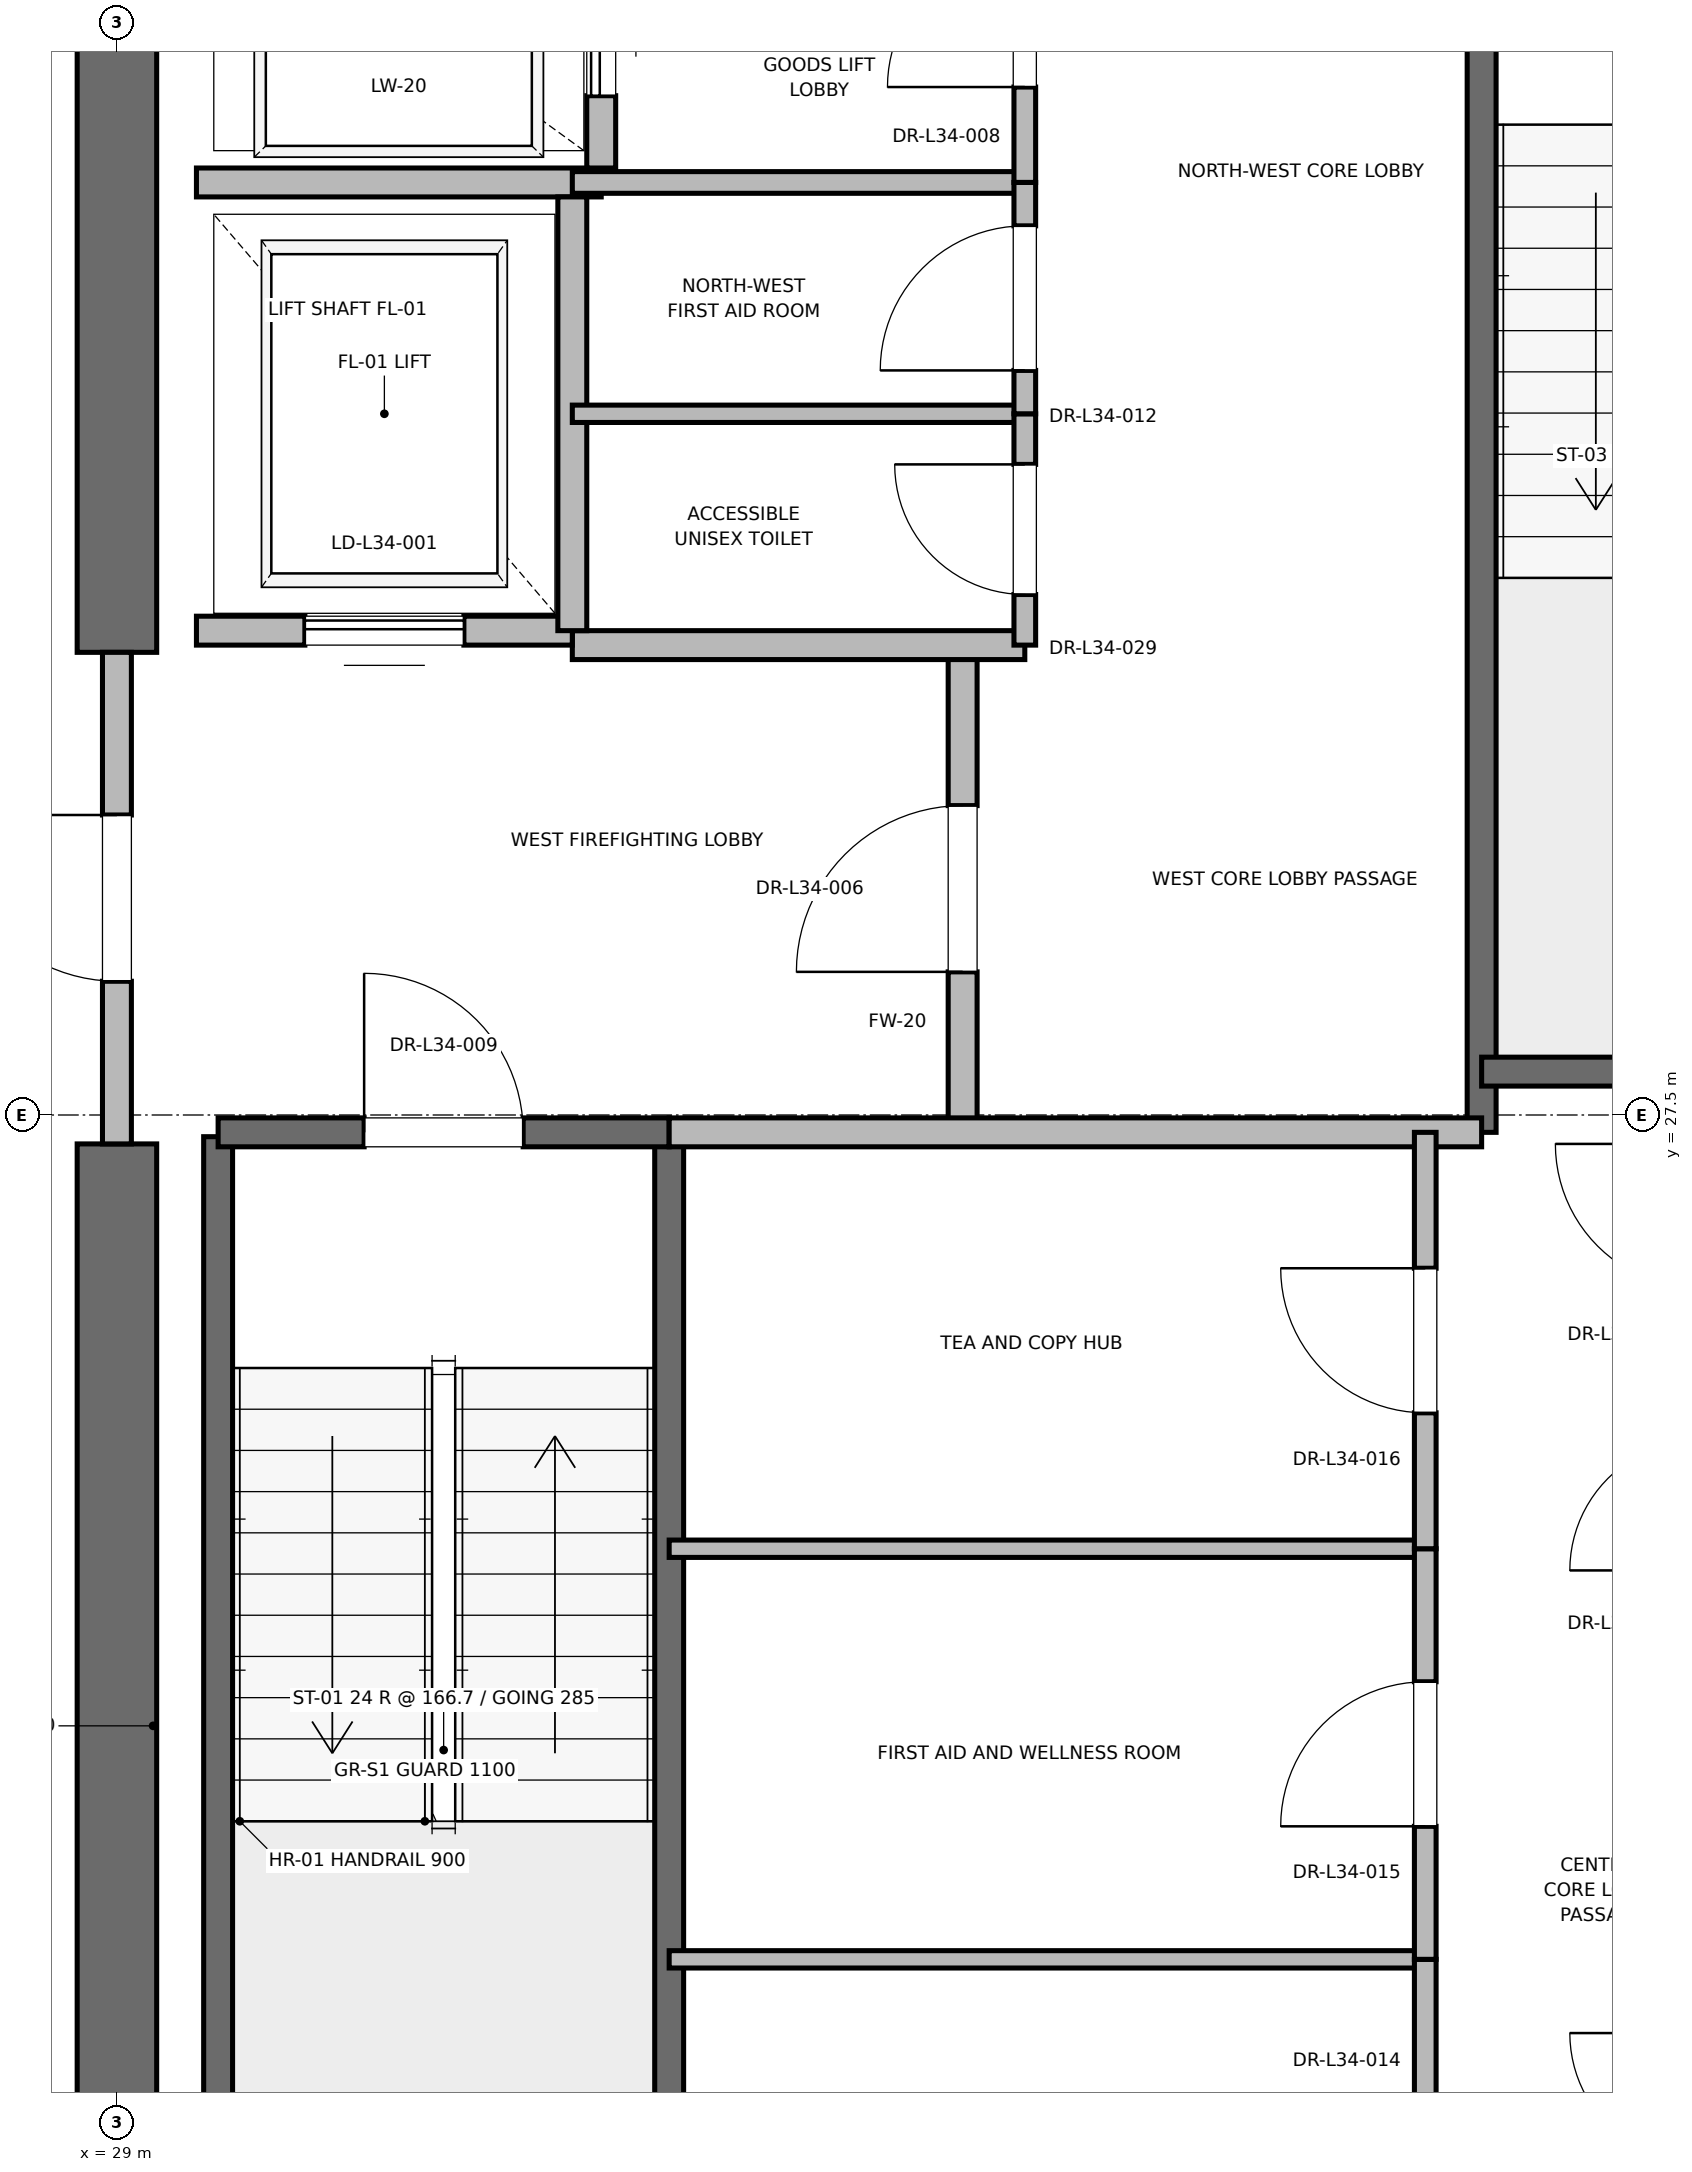
"""IFC4 building model, lengths in metres.
Left out: names, types, materials, properties, quantities, classifications, styles, units other than length and angle.
Written with IfcOpenShell. Run it as: python <this file> out.ifc"""

import sys

from ifc_helpers import new_model, si_unit, direction, frame, frame_2d, origin, place, context, subcontext, project, spatial, rectangle, extrude, element, fill, save


model = new_model("IFC4")
c1 = context("Model", 3, precision=1e-05, world=origin(), true_north=direction((0.0, 1.0)))
c2 = subcontext(c1, "Body", "Model", "MODEL_VIEW")
j1 = project(units=[si_unit("LENGTHUNIT", "METRE"), si_unit("PLANEANGLEUNIT", "RADIAN")], contexts=[c1])
p1 = place(None, origin())
s1 = spatial("IfcSite", under=j1, at=p1, CompositionType="ELEMENT")
p2 = place(p1, origin())
s2 = spatial("IfcBuilding", under=s1, at=p2, CompositionType="ELEMENT")
p3 = place(p2, frame((0.0, 0.0, 148.4)))
s3 = spatial("IfcBuildingStorey", under=s2, at=p3, CompositionType="ELEMENT", Elevation=148.4)
p4 = place(p3, frame((29.0, 18.5, 0.0), z_axis=(0.0, 0.0, 1.0), x_axis=(0.0, 1.0, 0.0)))
e1 = element("IfcWall", 1, at=p4, inside=s3, PredefinedType="SHEAR", context=c2, shape_type="SweptSolid", body=[
    extrude(rectangle(XDim=8.8, YDim=0.55, at=frame_2d((4.4, 0.0))), origin(), (0.0, 0.0, 1.0), 3.775),
])
p5 = place(p3, frame((29.0, 30.7, 0.0), z_axis=(0.0, 0.0, 1.0), x_axis=(0.0, 1.0, 0.0)))
e2 = element("IfcWall", 2, at=p5, inside=s3, PredefinedType="SHEAR", context=c2, shape_type="SweptSolid", body=[
    extrude(rectangle(XDim=5.8, YDim=0.55, at=frame_2d((2.9, 0.0))), origin(), (0.0, 0.0, 1.0), 3.775),
])
p6 = place(p3, frame((29.7, 19.2, 0.0), z_axis=(0.0, 0.0, 1.0), x_axis=(0.0, 1.0, 0.0)))
e3 = element("IfcWall", 3, at=p6, inside=s3, PredefinedType="SOLIDWALL", context=c2, shape_type="SweptSolid", body=[
    extrude(rectangle(XDim=8.15, YDim=0.2, at=frame_2d((4.075, 0.0))), origin(), (0.0, 0.0, 1.0), 3.775),
])
p7 = place(p3, frame((32.82, 18.6, 0.0), z_axis=(0.0, 0.0, 1.0), x_axis=(0.0, 1.0, 0.0)))
e4 = element("IfcWall", 4, at=p7, inside=s3, PredefinedType="SOLIDWALL", context=c2, shape_type="SweptSolid", body=[
    extrude(rectangle(XDim=8.78, YDim=0.2, at=frame_2d((4.39, 0.0))), origin(), (0.0, 0.0, 1.0), 3.775),
])
p8 = place(p3, frame((29.7, 27.38, 0.0), z_axis=(0.0, 0.0, 1.0), x_axis=(1.0, 0.0, 0.0)))
e5 = element("IfcWall", 5, at=p8, inside=s3, PredefinedType="SOLIDWALL", context=c2, shape_type="SweptSolid", body=[
    extrude(rectangle(XDim=3.12, YDim=0.2, at=frame_2d((1.56, 0.0))), origin(), (0.0, 0.0, 1.0), 3.775),
])
p9 = place(p8, frame((1.01, 0.0, 0.0)))
e6 = element("IfcOpeningElement", 6, at=p9, cuts=e5, PredefinedType="OPENING", context=c2, shape_type="SweptSolid", body=[
    extrude(rectangle(XDim=1.1, YDim=2.15, at=frame_2d((0.55, 1.075))), frame((0.0, 0.1, 0.0), z_axis=(0.0, -1.0, 0.0), x_axis=(1.0, 0.0, 0.0)), (0.0, 0.0, 1.0), 0.2),
])
p10 = place(p3, frame((38.44, 27.38, 0.0), z_axis=(0.0, 0.0, 1.0), x_axis=(0.0, 1.0, 0.0)))
e7 = element("IfcWall", 7, at=p10, inside=s3, PredefinedType="SOLIDWALL", context=c2, shape_type="SweptSolid", body=[
    extrude(rectangle(XDim=8.87, YDim=0.2, at=frame_2d((4.435, 0.0))), origin(), (0.0, 0.0, 1.0), 3.775),
])
p11 = place(p3, frame((38.44, 27.8, 0.0), z_axis=(0.0, 0.0, 1.0), x_axis=(1.0, 0.0, 0.0)))
e8 = element("IfcWall", 8, at=p11, inside=s3, PredefinedType="SOLIDWALL", context=c2, shape_type="SweptSolid", body=[
    extrude(rectangle(XDim=3.32, YDim=0.2, at=frame_2d((1.66, 0.0))), origin(), (0.0, 0.0, 1.0), 3.775),
])
p12 = place(p3, frame((34.85, 27.38, 0.0), z_axis=(0.0, 0.0, 1.0), x_axis=(0.0, 1.0, 0.0)))
e9 = element("IfcWall", 9, at=p12, inside=s3, PredefinedType="PARTITIONING", context=c2, shape_type="SweptSolid", body=[
    extrude(rectangle(XDim=3.37, YDim=0.2, at=frame_2d((1.685, 0.0))), origin(), (0.0, 0.0, 1.0), 3.775),
])
p13 = place(p12, frame((1.11, 0.0, 0.0)))
e10 = element("IfcOpeningElement", 10, at=p13, cuts=e9, PredefinedType="OPENING", context=c2, shape_type="SweptSolid", body=[
    extrude(rectangle(XDim=1.15, YDim=2.2, at=frame_2d((0.575, 1.1))), frame((0.0, 0.1, 0.0), z_axis=(0.0, -1.0, 0.0), x_axis=(1.0, 0.0, 0.0)), (0.0, 0.0, 1.0), 0.2),
])
p14 = place(p3, frame((29.0, 27.3, 0.0), z_axis=(0.0, 0.0, 1.0), x_axis=(0.0, 1.0, 0.0)))
e11 = element("IfcWall", 11, at=p14, inside=s3, PredefinedType="PARTITIONING", context=c2, shape_type="SweptSolid", body=[
    extrude(rectangle(XDim=3.4, YDim=0.2, at=frame_2d((1.7, 0.0))), origin(), (0.0, 0.0, 1.0), 2.755),
])
p15 = place(p14, frame((1.125, 0.0, 0.0)))
e12 = element("IfcOpeningElement", 12, at=p15, cuts=e11, PredefinedType="OPENING", context=c2, shape_type="SweptSolid", body=[
    extrude(rectangle(XDim=1.15, YDim=2.2, at=frame_2d((0.575, 1.1))), frame((0.0, 0.1, 0.0), z_axis=(0.0, -1.0, 0.0), x_axis=(1.0, 0.0, 0.0)), (0.0, 0.0, 1.0), 0.2),
])
p16 = place(p3, frame((32.82, 27.38, 0.0), z_axis=(0.0, 0.0, 1.0), x_axis=(1.0, 0.0, 0.0)))
e13 = element("IfcWall", 13, at=p16, inside=s3, PredefinedType="PARTITIONING", context=c2, shape_type="SweptSolid", body=[
    extrude(rectangle(XDim=5.62, YDim=0.2, at=frame_2d((2.81, 0.0))), origin(), (0.0, 0.0, 1.0), 3.775),
])
p17 = place(p3, frame((32.15, 30.75, 0.0), z_axis=(0.0, 0.0, 1.0), x_axis=(1.0, 0.0, 0.0)))
e14 = element("IfcWall", 14, at=p17, inside=s3, PredefinedType="PARTITIONING", context=c2, shape_type="SweptSolid", body=[
    extrude(rectangle(XDim=3.13, YDim=0.2, at=frame_2d((1.565, 0.0))), origin(), (0.0, 0.0, 1.0), 3.775),
])
p18 = place(p3, frame((29.55, 30.85, 0.0), z_axis=(0.0, 0.0, 1.0), x_axis=(1.0, 0.0, 0.0)))
e15 = element("IfcWall", 15, at=p18, inside=s3, PredefinedType="SOLIDWALL", context=c2, shape_type="SweptSolid", body=[
    extrude(rectangle(XDim=2.6, YDim=0.2, at=frame_2d((1.3, 0.0))), origin(), (0.0, 0.0, 1.0), 2.755),
])
p19 = place(p18, frame((0.75, 0.0, 0.0)))
e16 = element("IfcOpeningElement", 16, at=p19, cuts=e15, PredefinedType="OPENING", context=c2, shape_type="SweptSolid", body=[
    extrude(rectangle(XDim=1.1, YDim=2.2, at=frame_2d((0.55, 1.1))), frame((0.0, 0.1, 0.0), z_axis=(0.0, -1.0, 0.0), x_axis=(1.0, 0.0, 0.0)), (0.0, 0.0, 1.0), 0.2),
])
p20 = place(p3, frame((29.55, 33.95, 0.0), z_axis=(0.0, 0.0, 1.0), x_axis=(1.0, 0.0, 0.0)))
e17 = element("IfcWall", 17, at=p20, inside=s3, PredefinedType="SOLIDWALL", context=c2, shape_type="SweptSolid", body=[
    extrude(rectangle(XDim=2.8, YDim=0.2, at=frame_2d((1.4, 0.0))), origin(), (0.0, 0.0, 1.0), 3.775),
])
p21 = place(p3, frame((32.15, 30.85, 0.0), z_axis=(0.0, 0.0, 1.0), x_axis=(0.0, 1.0, 0.0)))
e18 = element("IfcWall", 18, at=p21, inside=s3, PredefinedType="SOLIDWALL", context=c2, shape_type="SweptSolid", body=[
    extrude(rectangle(XDim=3.0, YDim=0.2, at=frame_2d((1.5, 0.0))), origin(), (0.0, 0.0, 1.0), 3.775),
])
p22 = place(p3, frame((32.35, 34.05, 0.0), z_axis=(0.0, 0.0, 1.0), x_axis=(0.0, 1.0, 0.0)))
e19 = element("IfcWall", 19, at=p22, inside=s3, PredefinedType="SOLIDWALL", context=c2, shape_type="SweptSolid", body=[
    extrude(rectangle(XDim=2.1, YDim=0.2, at=frame_2d((1.05, 0.0))), origin(), (0.0, 0.0, 1.0), 3.775),
])
p23 = place(p22, frame((0.5, 0.0, 0.0)))
e20 = element("IfcOpeningElement", 20, at=p23, cuts=e19, PredefinedType="OPENING", context=c2, shape_type="SweptSolid", body=[
    extrude(rectangle(XDim=1.1, YDim=2.2, at=frame_2d((0.55, 1.1))), frame((0.0, 0.1, 0.0), z_axis=(0.0, -1.0, 0.0), x_axis=(1.0, 0.0, 0.0)), (0.0, 0.0, 1.0), 0.2),
])
p24 = place(p3, frame((32.15, 33.95, 0.0), z_axis=(0.0, 0.0, 1.0), x_axis=(1.0, 0.0, 0.0)))
e21 = element("IfcWall", 21, at=p24, inside=s3, PredefinedType="PARTITIONING", context=c2, shape_type="SweptSolid", body=[
    extrude(rectangle(XDim=3.13, YDim=0.15, at=frame_2d((1.565, 0.0))), origin(), (0.0, 0.0, 1.0), 2.85),
])
p25 = place(p3, frame((35.28, 33.95, 0.0), z_axis=(0.0, 0.0, 1.0), x_axis=(0.0, 1.0, 0.0)))
e22 = element("IfcWall", 22, at=p25, inside=s3, PredefinedType="PARTITIONING", context=c2, shape_type="SweptSolid", body=[
    extrude(rectangle(XDim=2.27, YDim=0.15, at=frame_2d((1.135, 0.0))), origin(), (0.0, 0.0, 1.0), 2.755),
])
p26 = place(p25, frame((0.66, 0.0, 0.0)))
e23 = element("IfcOpeningElement", 23, at=p26, cuts=e22, PredefinedType="OPENING", context=c2, shape_type="SweptSolid", body=[
    extrude(rectangle(XDim=0.95, YDim=2.15, at=frame_2d((0.475, 1.075))), frame((0.0, 0.075, 0.0), z_axis=(0.0, -1.0, 0.0), x_axis=(1.0, 0.0, 0.0)), (0.0, 0.0, 1.0), 0.15),
])
p27 = place(p3, frame((32.15, 32.35, 0.0), z_axis=(0.0, 0.0, 1.0), x_axis=(1.0, 0.0, 0.0)))
e24 = element("IfcWall", 24, at=p27, inside=s3, PredefinedType="PARTITIONING", context=c2, shape_type="SweptSolid", body=[
    extrude(rectangle(XDim=3.13, YDim=0.12, at=frame_2d((1.565, 0.0))), origin(), (0.0, 0.0, 1.0), 2.85),
])
p28 = place(p3, frame((35.28, 30.75, 0.0), z_axis=(0.0, 0.0, 1.0), x_axis=(0.0, 1.0, 0.0)))
e25 = element("IfcWall", 25, at=p28, inside=s3, PredefinedType="PARTITIONING", context=c2, shape_type="SweptSolid", body=[
    extrude(rectangle(XDim=1.6, YDim=0.15, at=frame_2d((0.8, 0.0))), origin(), (0.0, 0.0, 1.0), 2.85),
])
p29 = place(p28, frame((0.35, 0.0, 0.0)))
e26 = element("IfcOpeningElement", 26, at=p29, cuts=e25, PredefinedType="OPENING", context=c2, shape_type="SweptSolid", body=[
    extrude(rectangle(XDim=0.9, YDim=2.1, at=frame_2d((0.45, 1.05))), frame((0.0, 0.075, 0.0), z_axis=(0.0, -1.0, 0.0), x_axis=(1.0, 0.0, 0.0)), (0.0, 0.0, 1.0), 0.15),
])
p30 = place(p3, frame((35.28, 32.35, 0.0), z_axis=(0.0, 0.0, 1.0), x_axis=(0.0, 1.0, 0.0)))
e27 = element("IfcWall", 27, at=p30, inside=s3, PredefinedType="PARTITIONING", context=c2, shape_type="SweptSolid", body=[
    extrude(rectangle(XDim=1.6, YDim=0.15, at=frame_2d((0.8, 0.0))), origin(), (0.0, 0.0, 1.0), 2.85),
])
p31 = place(p30, frame((0.3, 0.0, 0.0)))
e28 = element("IfcOpeningElement", 28, at=p31, cuts=e27, PredefinedType="OPENING", context=c2, shape_type="SweptSolid", body=[
    extrude(rectangle(XDim=1.0, YDim=2.15, at=frame_2d((0.5, 1.075))), frame((0.0, 0.075, 0.0), z_axis=(0.0, -1.0, 0.0), x_axis=(1.0, 0.0, 0.0)), (0.0, 0.0, 1.0), 0.15),
])
for number, where, z_axis, x_axis in (
    (29, (32.82, 21.66, 0.0), (0.0, 0.0, 1.0), (1.0, 0.0, 0.0)),
    (30, (32.82, 24.5, 0.0), (0.0, 0.0, 1.0), (1.0, 0.0, 0.0)),
):
    element("IfcWall", number, at=place(p3, frame(where, z_axis=z_axis, x_axis=x_axis)), inside=s3, PredefinedType="PARTITIONING", context=c2, shape_type="SweptSolid", body=[
        extrude(rectangle(XDim=5.23, YDim=0.12, at=frame_2d((2.615, 0.0))), origin(), (0.0, 0.0, 1.0), 2.85),
    ])
p32 = place(p3, frame((38.05, 18.6, 0.0), z_axis=(0.0, 0.0, 1.0), x_axis=(0.0, 1.0, 0.0)))
e31 = element("IfcWall", 31, at=p32, inside=s3, PredefinedType="PARTITIONING", context=c2, shape_type="SweptSolid", body=[
    extrude(rectangle(XDim=3.06, YDim=0.15, at=frame_2d((1.53, 0.0))), origin(), (0.0, 0.0, 1.0), 2.755),
])
p33 = place(p32, frame((1.03, 0.0, 0.0)))
e32 = element("IfcOpeningElement", 32, at=p33, cuts=e31, PredefinedType="OPENING", context=c2, shape_type="SweptSolid", body=[
    extrude(rectangle(XDim=1.0, YDim=2.15, at=frame_2d((0.5, 1.075))), frame((0.0, 0.075, 0.0), z_axis=(0.0, -1.0, 0.0), x_axis=(1.0, 0.0, 0.0)), (0.0, 0.0, 1.0), 0.15),
])
p34 = place(p3, frame((38.05, 21.66, 0.0), z_axis=(0.0, 0.0, 1.0), x_axis=(0.0, 1.0, 0.0)))
e33 = element("IfcWall", 33, at=p34, inside=s3, PredefinedType="PARTITIONING", context=c2, shape_type="SweptSolid", body=[
    extrude(rectangle(XDim=2.84, YDim=0.15, at=frame_2d((1.42, 0.0))), origin(), (0.0, 0.0, 1.0), 2.85),
])
p35 = place(p34, frame((0.92, 0.0, 0.0)))
e34 = element("IfcOpeningElement", 34, at=p35, cuts=e33, PredefinedType="OPENING", context=c2, shape_type="SweptSolid", body=[
    extrude(rectangle(XDim=1.0, YDim=2.15, at=frame_2d((0.5, 1.075))), frame((0.0, 0.075, 0.0), z_axis=(0.0, -1.0, 0.0), x_axis=(1.0, 0.0, 0.0)), (0.0, 0.0, 1.0), 0.15),
])
p36 = place(p3, frame((38.05, 24.5, 0.0), z_axis=(0.0, 0.0, 1.0), x_axis=(0.0, 1.0, 0.0)))
e35 = element("IfcWall", 35, at=p36, inside=s3, PredefinedType="PARTITIONING", context=c2, shape_type="SweptSolid", body=[
    extrude(rectangle(XDim=2.88, YDim=0.15, at=frame_2d((1.44, 0.0))), origin(), (0.0, 0.0, 1.0), 2.85),
])
p37 = place(p36, frame((0.94, 0.0, 0.0)))
e36 = element("IfcOpeningElement", 36, at=p37, cuts=e35, PredefinedType="OPENING", context=c2, shape_type="SweptSolid", body=[
    extrude(rectangle(XDim=1.0, YDim=2.15, at=frame_2d((0.5, 1.075))), frame((0.0, 0.075, 0.0), z_axis=(0.0, -1.0, 0.0), x_axis=(1.0, 0.0, 0.0)), (0.0, 0.0, 1.0), 0.15),
])
p38 = place(p9, origin())
e37 = element("IfcDoor", 37, at=p38, inside=s3, OperationType="SINGLE_SWING_LEFT", PredefinedType="DOOR", context=c2, shape_type="SweptSolid", body=[
    extrude(rectangle(XDim=1.1, YDim=2.15, at=frame_2d((0.55, 1.075))), frame((0.0, 0.025, 0.0), z_axis=(0.0, -1.0, 0.0), x_axis=(1.0, 0.0, 0.0)), (0.0, 0.0, 1.0), 0.05),
])
fill(e6, e37)
p39 = place(p13, origin())
e38 = element("IfcDoor", 38, at=p39, inside=s3, OperationType="SINGLE_SWING_LEFT", PredefinedType="DOOR", context=c2, shape_type="SweptSolid", body=[
    extrude(rectangle(XDim=1.15, YDim=2.2, at=frame_2d((0.575, 1.1))), frame((0.0, 0.025, 0.0), z_axis=(0.0, -1.0, 0.0), x_axis=(1.0, 0.0, 0.0)), (0.0, 0.0, 1.0), 0.05),
])
fill(e10, e38)
p40 = place(p15, origin())
e39 = element("IfcDoor", 39, at=p40, inside=s3, OperationType="SINGLE_SWING_RIGHT", PredefinedType="DOOR", context=c2, shape_type="SweptSolid", body=[
    extrude(rectangle(XDim=1.15, YDim=2.2, at=frame_2d((0.575, 1.1))), frame((0.0, 0.025, 0.0), z_axis=(0.0, -1.0, 0.0), x_axis=(1.0, 0.0, 0.0)), (0.0, 0.0, 1.0), 0.05),
])
fill(e12, e39)
p41 = place(p19, origin())
e40 = element("IfcDoor", 40, at=p41, inside=s3, OperationType="SLIDING_TO_RIGHT", PredefinedType="DOOR", context=c2, shape_type="SweptSolid", body=[
    extrude(rectangle(XDim=1.1, YDim=2.2, at=frame_2d((0.55, 1.1))), frame((0.0, 0.025, 0.0), z_axis=(0.0, -1.0, 0.0), x_axis=(1.0, 0.0, 0.0)), (0.0, 0.0, 1.0), 0.05),
])
fill(e16, e40)
p42 = place(p23, origin())
e41 = element("IfcDoor", 41, at=p42, inside=s3, OperationType="SLIDING_TO_RIGHT", PredefinedType="DOOR", context=c2, shape_type="SweptSolid", body=[
    extrude(rectangle(XDim=1.1, YDim=2.2, at=frame_2d((0.55, 1.1))), frame((0.0, 0.025, 0.0), z_axis=(0.0, -1.0, 0.0), x_axis=(1.0, 0.0, 0.0)), (0.0, 0.0, 1.0), 0.05),
])
fill(e20, e41)
p43 = place(p26, origin())
e42 = element("IfcDoor", 42, at=p43, inside=s3, OperationType="SINGLE_SWING_LEFT", PredefinedType="DOOR", context=c2, shape_type="SweptSolid", body=[
    extrude(rectangle(XDim=0.95, YDim=2.15, at=frame_2d((0.475, 1.075))), frame((0.0, 0.025, 0.0), z_axis=(0.0, -1.0, 0.0), x_axis=(1.0, 0.0, 0.0)), (0.0, 0.0, 1.0), 0.05),
])
fill(e23, e42)
p44 = place(p29, origin())
e43 = element("IfcDoor", 43, at=p44, inside=s3, OperationType="SINGLE_SWING_RIGHT", PredefinedType="DOOR", context=c2, shape_type="SweptSolid", body=[
    extrude(rectangle(XDim=0.9, YDim=2.1, at=frame_2d((0.45, 1.05))), frame((0.0, 0.025, 0.0), z_axis=(0.0, -1.0, 0.0), x_axis=(1.0, 0.0, 0.0)), (0.0, 0.0, 1.0), 0.05),
])
fill(e26, e43)
p45 = place(p31, origin())
e44 = element("IfcDoor", 44, at=p45, inside=s3, OperationType="SINGLE_SWING_LEFT", PredefinedType="DOOR", context=c2, shape_type="SweptSolid", body=[
    extrude(rectangle(XDim=1.0, YDim=2.15, at=frame_2d((0.5, 1.075))), frame((0.0, 0.025, 0.0), z_axis=(0.0, -1.0, 0.0), x_axis=(1.0, 0.0, 0.0)), (0.0, 0.0, 1.0), 0.05),
])
fill(e28, e44)
p46 = place(p35, origin())
e45 = element("IfcDoor", 45, at=p46, inside=s3, OperationType="SINGLE_SWING_LEFT", PredefinedType="DOOR", context=c2, shape_type="SweptSolid", body=[
    extrude(rectangle(XDim=1.0, YDim=2.15, at=frame_2d((0.5, 1.075))), frame((0.0, 0.025, 0.0), z_axis=(0.0, -1.0, 0.0), x_axis=(1.0, 0.0, 0.0)), (0.0, 0.0, 1.0), 0.05),
])
fill(e34, e45)
p47 = place(p37, origin())
e46 = element("IfcDoor", 46, at=p47, inside=s3, OperationType="SINGLE_SWING_RIGHT", PredefinedType="DOOR", context=c2, shape_type="SweptSolid", body=[
    extrude(rectangle(XDim=1.0, YDim=2.15, at=frame_2d((0.5, 1.075))), frame((0.0, 0.025, 0.0), z_axis=(0.0, -1.0, 0.0), x_axis=(1.0, 0.0, 0.0)), (0.0, 0.0, 1.0), 0.05),
])
fill(e36, e46)
save(model, sys.argv[1])
